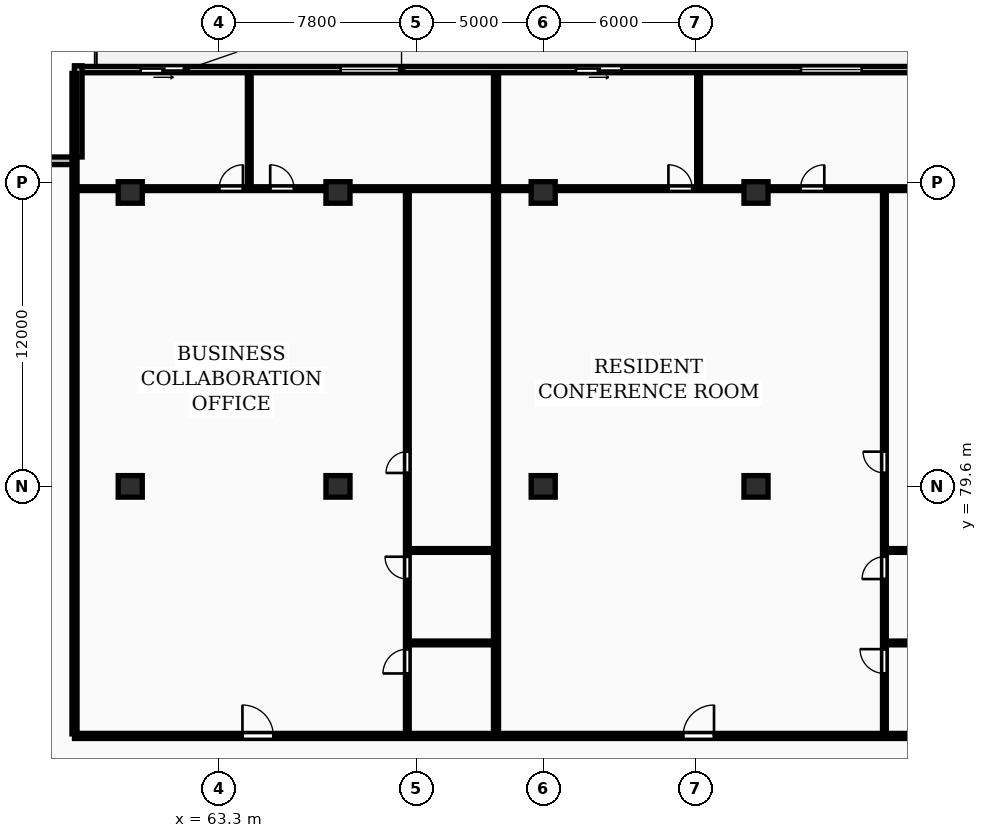
"""IFC4 building model, lengths in metres.
Left out: names, types, materials, properties, quantities, classifications, styles, units other than length and angle.
Written with IfcOpenShell. Run it as: python <this file> out.ifc"""

import sys

from ifc_helpers import new_model, si_unit, direction, frame, frame_2d, origin, origin_2d, place, context, subcontext, project, spatial, rectangle, extrude, element, fill, save


model = new_model("IFC4")
c1 = context("Model", 3, precision=1e-05, world=origin(), true_north=direction((0.0, 1.0)))
c2 = subcontext(c1, "Body", "Model", "MODEL_VIEW")
j1 = project(units=[si_unit("LENGTHUNIT", "METRE"), si_unit("PLANEANGLEUNIT", "RADIAN")], contexts=[c1])
p1 = place(None, origin())
s1 = spatial("IfcSite", under=j1, at=p1, CompositionType="ELEMENT")
p2 = place(p1, origin())
s2 = spatial("IfcBuilding", under=s1, at=p2, CompositionType="ELEMENT")
p3 = place(p2, frame((0.0, 0.0, 126.3)))
s3 = spatial("IfcBuildingStorey", under=s2, at=p3, CompositionType="ELEMENT", Elevation=126.3)
for number, where, z_axis, x_axis in (
    (1, (59.8, 79.6, 0.0), (0.0, 0.0, 1.0), (1.0, 0.0, 0.0)),
    (2, (59.8, 91.2, 0.0), (0.0, 0.0, 1.0), (1.0, 0.0, 0.0)),
    (3, (68.0, 79.6, 0.0), (0.0, 0.0, 1.0), (1.0, 0.0, 0.0)),
    (4, (68.0, 91.2, 0.0), (0.0, 0.0, 1.0), (1.0, 0.0, 0.0)),
    (5, (76.1, 79.6, 0.0), (0.0, 0.0, 1.0), (1.0, 0.0, 0.0)),
    (6, (76.1, 91.2, 0.0), (0.0, 0.0, 1.0), (1.0, 0.0, 0.0)),
    (7, (84.5, 79.6, 0.0), (0.0, 0.0, 1.0), (1.0, 0.0, 0.0)),
    (8, (84.5, 91.2, 0.0), (0.0, 0.0, 1.0), (1.0, 0.0, 0.0)),
):
    element("IfcColumn", number, at=place(p3, frame(where, z_axis=z_axis, x_axis=x_axis)), inside=s3, PredefinedType="COLUMN", context=c2, shape_type="SweptSolid", body=[
        extrude(rectangle(XDim=0.95, YDim=0.85, at=origin_2d()), origin(), (0.0, 0.0, 1.0), 3.25),
    ])
p4 = place(p3, frame((130.6, 96.05, 0.0), z_axis=(0.0, 0.0, 1.0), x_axis=(-1.0, 0.0, 0.0)))
e9 = element("IfcWall", 9, at=p4, inside=s3, PredefinedType="STANDARD", context=c2, shape_type="SweptSolid", body=[
    extrude(rectangle(XDim=73.0, YDim=0.25, at=frame_2d((36.5, 0.0))), origin(), (0.0, 0.0, 1.0), 2.97),
])
p5 = place(p4, frame((68.591, 0.0, 0.0)))
e10 = element("IfcOpeningElement", 10, at=p5, cuts=e9, PredefinedType="OPENING", context=c2, shape_type="SweptSolid", body=[
    extrude(rectangle(XDim=1.8, YDim=2.2, at=frame_2d((0.9, 1.1))), frame((0.0, 0.135, 0.0), z_axis=(0.0, -1.0, 0.0), x_axis=(1.0, 0.0, 0.0)), (0.0, 0.0, 1.0), 0.27),
])
p6 = place(p4, frame((60.092, 0.0, 0.85)))
e11 = element("IfcOpeningElement", 11, at=p6, cuts=e9, PredefinedType="OPENING", context=c2, shape_type="SweptSolid", body=[
    extrude(rectangle(XDim=2.4, YDim=1.9, at=frame_2d((1.2, 0.95))), frame((0.0, 0.135, 0.0), z_axis=(0.0, -1.0, 0.0), x_axis=(1.0, 0.0, 0.0)), (0.0, 0.0, 1.0), 0.27),
])
p7 = place(p4, frame((51.405, 0.0, 0.0)))
e12 = element("IfcOpeningElement", 12, at=p7, cuts=e9, PredefinedType="OPENING", context=c2, shape_type="SweptSolid", body=[
    extrude(rectangle(XDim=1.8, YDim=2.2, at=frame_2d((0.9, 1.1))), frame((0.0, 0.135, 0.0), z_axis=(0.0, -1.0, 0.0), x_axis=(1.0, 0.0, 0.0)), (0.0, 0.0, 1.0), 0.27),
])
p8 = place(p4, frame((41.925, 0.0, 0.85)))
e13 = element("IfcOpeningElement", 13, at=p8, cuts=e9, PredefinedType="OPENING", context=c2, shape_type="SweptSolid", body=[
    extrude(rectangle(XDim=2.4, YDim=1.9, at=frame_2d((1.2, 0.95))), frame((0.0, 0.135, 0.0), z_axis=(0.0, -1.0, 0.0), x_axis=(1.0, 0.0, 0.0)), (0.0, 0.0, 1.0), 0.27),
])
p9 = place(p4, frame((29.091, 0.0, 0.85)))
e14 = element("IfcOpeningElement", 14, at=p9, cuts=e9, PredefinedType="OPENING", context=c2, shape_type="SweptSolid", body=[
    extrude(rectangle(XDim=2.4, YDim=1.9, at=frame_2d((1.2, 0.95))), frame((0.0, 0.135, 0.0), z_axis=(0.0, -1.0, 0.0), x_axis=(1.0, 0.0, 0.0)), (0.0, 0.0, 1.0), 0.27),
])
p10 = place(p4, frame((23.727, 0.0, 0.85)))
e15 = element("IfcOpeningElement", 15, at=p10, cuts=e9, PredefinedType="OPENING", context=c2, shape_type="SweptSolid", body=[
    extrude(rectangle(XDim=2.4, YDim=1.9, at=frame_2d((1.2, 0.95))), frame((0.0, 0.135, 0.0), z_axis=(0.0, -1.0, 0.0), x_axis=(1.0, 0.0, 0.0)), (0.0, 0.0, 1.0), 0.27),
])
p11 = place(p4, frame((34.407, 0.0, 0.0)))
e16 = element("IfcOpeningElement", 16, at=p11, cuts=e9, PredefinedType="OPENING", context=c2, shape_type="SweptSolid", body=[
    extrude(rectangle(XDim=1.8, YDim=2.2, at=frame_2d((0.9, 1.1))), frame((0.0, 0.135, 0.0), z_axis=(0.0, -1.0, 0.0), x_axis=(1.0, 0.0, 0.0)), (0.0, 0.0, 1.0), 0.27),
])
p12 = place(p4, frame((18.72, 0.0, 0.85)))
e17 = element("IfcOpeningElement", 17, at=p12, cuts=e9, PredefinedType="OPENING", context=c2, shape_type="SweptSolid", body=[
    extrude(rectangle(XDim=2.4, YDim=1.9, at=frame_2d((1.2, 0.95))), frame((0.0, 0.135, 0.0), z_axis=(0.0, -1.0, 0.0), x_axis=(1.0, 0.0, 0.0)), (0.0, 0.0, 1.0), 0.27),
])
p13 = place(p4, frame((9.169, 0.0, 0.85)))
e18 = element("IfcOpeningElement", 18, at=p13, cuts=e9, PredefinedType="OPENING", context=c2, shape_type="SweptSolid", body=[
    extrude(rectangle(XDim=2.4, YDim=1.9, at=frame_2d((1.2, 0.95))), frame((0.0, 0.135, 0.0), z_axis=(0.0, -1.0, 0.0), x_axis=(1.0, 0.0, 0.0)), (0.0, 0.0, 1.0), 0.27),
])
p14 = place(p4, frame((5.506, 0.0, 0.85)))
e19 = element("IfcOpeningElement", 19, at=p14, cuts=e9, PredefinedType="OPENING", context=c2, shape_type="SweptSolid", body=[
    extrude(rectangle(XDim=1.8, YDim=1.8, at=frame_2d((0.9, 0.9))), frame((0.0, 0.135, 0.0), z_axis=(0.0, -1.0, 0.0), x_axis=(1.0, 0.0, 0.0)), (0.0, 0.0, 1.0), 0.27),
])
p15 = place(p4, frame((14.015, 0.0, 0.0)))
e20 = element("IfcOpeningElement", 20, at=p15, cuts=e9, PredefinedType="OPENING", context=c2, shape_type="SweptSolid", body=[
    extrude(rectangle(XDim=1.8, YDim=2.2, at=frame_2d((0.9, 1.1))), frame((0.0, 0.135, 0.0), z_axis=(0.0, -1.0, 0.0), x_axis=(1.0, 0.0, 0.0)), (0.0, 0.0, 1.0), 0.27),
])
p16 = place(p4, frame((1.135, 0.0, 0.85)))
e21 = element("IfcOpeningElement", 21, at=p16, cuts=e9, PredefinedType="OPENING", context=c2, shape_type="SweptSolid", body=[
    extrude(rectangle(XDim=2.4, YDim=1.9, at=frame_2d((1.2, 0.95))), frame((0.0, 0.135, 0.0), z_axis=(0.0, -1.0, 0.0), x_axis=(1.0, 0.0, 0.0)), (0.0, 0.0, 1.0), 0.27),
])
p17 = place(p3, frame((57.75, 96.2, 0.0), z_axis=(0.0, 0.0, 1.0), x_axis=(0.0, -1.0, 0.0)))
e22 = element("IfcWall", 22, at=p17, inside=s3, PredefinedType="STANDARD", context=c2, shape_type="SweptSolid", body=[
    extrude(rectangle(XDim=3.6, YDim=0.3, at=frame_2d((1.8, 0.0))), origin(), (0.0, 0.0, 1.0), 2.97),
])
p18 = place(p3, frame((57.6, 92.45, 0.0), z_axis=(0.0, 0.0, 1.0), x_axis=(-1.0, 0.0, 0.0)))
e23 = element("IfcWall", 23, at=p18, inside=s3, PredefinedType="STANDARD", context=c2, shape_type="SweptSolid", body=[
    extrude(rectangle(XDim=3.6, YDim=0.3, at=frame_2d((1.8, 0.0))), origin(), (0.0, 0.0, 1.0), 2.97),
])
for number, where, z_axis, x_axis in (
    (24, (57.6, 69.83, 0.0), (0.0, 0.0, 1.0), (0.0, 1.0, 0.0)),
    (25, (74.238, 69.83, 0.0), (0.0, 0.0, 1.0), (0.0, 1.0, 0.0)),
):
    element("IfcWall", number, at=place(p3, frame(where, z_axis=z_axis, x_axis=x_axis)), inside=s3, PredefinedType="PARTITIONING", context=c2, shape_type="SweptSolid", body=[
        extrude(rectangle(XDim=26.07, YDim=0.2, at=frame_2d((13.035, 0.0))), origin(), (0.0, 0.0, 1.0), 2.97),
    ])
for number, where, z_axis, x_axis in (
    (26, (70.798, 73.42, 0.0), (0.0, 0.0, 1.0), (1.0, 0.0, 0.0)),
    (27, (70.798, 77.07, 0.0), (0.0, 0.0, 1.0), (1.0, 0.0, 0.0)),
):
    element("IfcWall", number, at=place(p3, frame(where, z_axis=z_axis, x_axis=x_axis)), inside=s3, PredefinedType="PARTITIONING", context=c2, shape_type="SweptSolid", body=[
        extrude(rectangle(XDim=3.36, YDim=0.15, at=frame_2d((1.68, 0.0))), origin(), (0.0, 0.0, 1.0), 2.97),
    ])
p19 = place(p3, frame((70.738, 69.81, 0.0), z_axis=(0.0, 0.0, 1.0), x_axis=(0.0, 1.0, 0.0)))
e28 = element("IfcWall", 28, at=p19, inside=s3, PredefinedType="PARTITIONING", context=c2, shape_type="SweptSolid", body=[
    extrude(rectangle(XDim=21.48, YDim=0.15, at=frame_2d((10.74, 0.0))), origin(), (0.0, 0.0, 1.0), 2.97),
])
p20 = place(p19, frame((2.406, 0.0, 0.0)))
e29 = element("IfcOpeningElement", 29, at=p20, cuts=e28, PredefinedType="OPENING", context=c2, shape_type="SweptSolid", body=[
    extrude(rectangle(XDim=0.96, YDim=2.1, at=frame_2d((0.48, 1.05))), frame((0.0, 0.085, 0.0), z_axis=(0.0, -1.0, 0.0), x_axis=(1.0, 0.0, 0.0)), (0.0, 0.0, 1.0), 0.17),
])
p21 = place(p19, frame((6.133, 0.0, 0.0)))
e30 = element("IfcOpeningElement", 30, at=p21, cuts=e28, PredefinedType="OPENING", context=c2, shape_type="SweptSolid", body=[
    extrude(rectangle(XDim=0.88, YDim=2.06, at=frame_2d((0.44, 1.03))), frame((0.0, 0.085, 0.0), z_axis=(0.0, -1.0, 0.0), x_axis=(1.0, 0.0, 0.0)), (0.0, 0.0, 1.0), 0.17),
])
p22 = place(p19, frame((10.32, 0.0, 0.0)))
e31 = element("IfcOpeningElement", 31, at=p22, cuts=e28, PredefinedType="OPENING", context=c2, shape_type="SweptSolid", body=[
    extrude(rectangle(XDim=0.84, YDim=2.04, at=frame_2d((0.42, 1.02))), frame((0.0, 0.085, 0.0), z_axis=(0.0, -1.0, 0.0), x_axis=(1.0, 0.0, 0.0)), (0.0, 0.0, 1.0), 0.17),
])
p23 = place(p3, frame((64.499, 91.43, 0.0), z_axis=(0.0, 0.0, 1.0), x_axis=(0.0, 1.0, 0.0)))
e32 = element("IfcWall", 32, at=p23, inside=s3, PredefinedType="PARTITIONING", context=c2, shape_type="SweptSolid", body=[
    extrude(rectangle(XDim=4.47, YDim=0.15, at=frame_2d((2.235, 0.0))), origin(), (0.0, 0.0, 1.0), 2.97),
])
p24 = place(p3, frame((57.68, 91.35, 0.0), z_axis=(0.0, 0.0, 1.0), x_axis=(1.0, 0.0, 0.0)))
e33 = element("IfcWall", 33, at=p24, inside=s3, PredefinedType="PARTITIONING", context=c2, shape_type="SweptSolid", body=[
    extrude(rectangle(XDim=16.478, YDim=0.15, at=frame_2d((8.239, 0.0))), origin(), (0.0, 0.0, 1.0), 2.663),
])
p25 = place(p24, frame((5.629, 0.0, 0.0)))
e34 = element("IfcOpeningElement", 34, at=p25, cuts=e33, PredefinedType="OPENING", context=c2, shape_type="SweptSolid", body=[
    extrude(rectangle(XDim=0.94, YDim=2.1, at=frame_2d((0.47, 1.05))), frame((0.0, 0.085, 0.0), z_axis=(0.0, -1.0, 0.0), x_axis=(1.0, 0.0, 0.0)), (0.0, 0.0, 1.0), 0.17),
])
p26 = place(p24, frame((7.645, 0.0, 0.0)))
e35 = element("IfcOpeningElement", 35, at=p26, cuts=e33, PredefinedType="OPENING", context=c2, shape_type="SweptSolid", body=[
    extrude(rectangle(XDim=0.94, YDim=2.1, at=frame_2d((0.47, 1.05))), frame((0.0, 0.085, 0.0), z_axis=(0.0, -1.0, 0.0), x_axis=(1.0, 0.0, 0.0)), (0.0, 0.0, 1.0), 0.17),
])
for number, where, z_axis, x_axis in (
    (36, (89.627, 73.42, 0.0), (0.0, 0.0, 1.0), (1.0, 0.0, 0.0)),
    (37, (89.627, 77.07, 0.0), (0.0, 0.0, 1.0), (1.0, 0.0, 0.0)),
):
    element("IfcWall", number, at=place(p3, frame(where, z_axis=z_axis, x_axis=x_axis)), inside=s3, PredefinedType="PARTITIONING", context=c2, shape_type="SweptSolid", body=[
        extrude(rectangle(XDim=3.13, YDim=0.15, at=frame_2d((1.565, 0.0))), origin(), (0.0, 0.0, 1.0), 2.97),
    ])
p27 = place(p3, frame((89.567, 69.81, 0.0), z_axis=(0.0, 0.0, 1.0), x_axis=(0.0, 1.0, 0.0)))
e38 = element("IfcWall", 38, at=p27, inside=s3, PredefinedType="PARTITIONING", context=c2, shape_type="SweptSolid", body=[
    extrude(rectangle(XDim=21.48, YDim=0.15, at=frame_2d((10.74, 0.0))), origin(), (0.0, 0.0, 1.0), 2.97),
])
p28 = place(p27, frame((2.406, 0.0, 0.0)))
e39 = element("IfcOpeningElement", 39, at=p28, cuts=e38, PredefinedType="OPENING", context=c2, shape_type="SweptSolid", body=[
    extrude(rectangle(XDim=0.96, YDim=2.1, at=frame_2d((0.48, 1.05))), frame((0.0, 0.085, 0.0), z_axis=(0.0, -1.0, 0.0), x_axis=(1.0, 0.0, 0.0)), (0.0, 0.0, 1.0), 0.17),
])
p29 = place(p27, frame((6.133, 0.0, 0.0)))
e40 = element("IfcOpeningElement", 40, at=p29, cuts=e38, PredefinedType="OPENING", context=c2, shape_type="SweptSolid", body=[
    extrude(rectangle(XDim=0.88, YDim=2.06, at=frame_2d((0.44, 1.03))), frame((0.0, 0.085, 0.0), z_axis=(0.0, -1.0, 0.0), x_axis=(1.0, 0.0, 0.0)), (0.0, 0.0, 1.0), 0.17),
])
p30 = place(p27, frame((10.32, 0.0, 0.0)))
e41 = element("IfcOpeningElement", 41, at=p30, cuts=e38, PredefinedType="OPENING", context=c2, shape_type="SweptSolid", body=[
    extrude(rectangle(XDim=0.84, YDim=2.04, at=frame_2d((0.42, 1.02))), frame((0.0, 0.085, 0.0), z_axis=(0.0, -1.0, 0.0), x_axis=(1.0, 0.0, 0.0)), (0.0, 0.0, 1.0), 0.17),
])
p31 = place(p3, frame((82.232, 91.43, 0.0), z_axis=(0.0, 0.0, 1.0), x_axis=(0.0, 1.0, 0.0)))
e42 = element("IfcWall", 42, at=p31, inside=s3, PredefinedType="PARTITIONING", context=c2, shape_type="SweptSolid", body=[
    extrude(rectangle(XDim=4.47, YDim=0.15, at=frame_2d((2.235, 0.0))), origin(), (0.0, 0.0, 1.0), 2.97),
])
p32 = place(p3, frame((74.317, 91.35, 0.0), z_axis=(0.0, 0.0, 1.0), x_axis=(1.0, 0.0, 0.0)))
e43 = element("IfcWall", 43, at=p32, inside=s3, PredefinedType="PARTITIONING", context=c2, shape_type="SweptSolid", body=[
    extrude(rectangle(XDim=18.44, YDim=0.15, at=frame_2d((9.22, 0.0))), origin(), (0.0, 0.0, 1.0), 2.663),
])
p33 = place(p32, frame((6.725, 0.0, 0.0)))
e44 = element("IfcOpeningElement", 44, at=p33, cuts=e43, PredefinedType="OPENING", context=c2, shape_type="SweptSolid", body=[
    extrude(rectangle(XDim=0.94, YDim=2.1, at=frame_2d((0.47, 1.05))), frame((0.0, 0.085, 0.0), z_axis=(0.0, -1.0, 0.0), x_axis=(1.0, 0.0, 0.0)), (0.0, 0.0, 1.0), 0.17),
])
p34 = place(p32, frame((11.938, 0.0, 0.0)))
e45 = element("IfcOpeningElement", 45, at=p34, cuts=e43, PredefinedType="OPENING", context=c2, shape_type="SweptSolid", body=[
    extrude(rectangle(XDim=0.94, YDim=2.1, at=frame_2d((0.47, 1.05))), frame((0.0, 0.085, 0.0), z_axis=(0.0, -1.0, 0.0), x_axis=(1.0, 0.0, 0.0)), (0.0, 0.0, 1.0), 0.17),
])
p35 = place(p3, frame((57.6, 69.75, 0.0), z_axis=(0.0, 0.0, 1.0), x_axis=(1.0, 0.0, 0.0)))
e46 = element("IfcWall", 46, at=p35, inside=s3, PredefinedType="PARTITIONING", context=c2, shape_type="SweptSolid", body=[
    extrude(rectangle(XDim=73.0, YDim=0.2, at=frame_2d((36.5, 0.0))), origin(), (0.0, 0.0, 1.0), 2.97),
])
p36 = place(p35, frame((6.629, 0.0, 0.0)))
e47 = element("IfcOpeningElement", 47, at=p36, cuts=e46, PredefinedType="OPENING", context=c2, shape_type="SweptSolid", body=[
    extrude(rectangle(XDim=1.22, YDim=2.18, at=frame_2d((0.61, 1.09))), frame((0.0, 0.11, 0.0), z_axis=(0.0, -1.0, 0.0), x_axis=(1.0, 0.0, 0.0)), (0.0, 0.0, 1.0), 0.22),
])
p37 = place(p35, frame((24.022, 0.0, 0.0)))
e48 = element("IfcOpeningElement", 48, at=p37, cuts=e46, PredefinedType="OPENING", context=c2, shape_type="SweptSolid", body=[
    extrude(rectangle(XDim=1.22, YDim=2.18, at=frame_2d((0.61, 1.09))), frame((0.0, 0.11, 0.0), z_axis=(0.0, -1.0, 0.0), x_axis=(1.0, 0.0, 0.0)), (0.0, 0.0, 1.0), 0.22),
])
p38 = place(p35, frame((37.768, 0.0, 0.0)))
e49 = element("IfcOpeningElement", 49, at=p38, cuts=e46, PredefinedType="OPENING", context=c2, shape_type="SweptSolid", body=[
    extrude(rectangle(XDim=0.95, YDim=2.15, at=frame_2d((0.475, 1.075))), frame((0.0, 0.11, 0.0), z_axis=(0.0, -1.0, 0.0), x_axis=(1.0, 0.0, 0.0)), (0.0, 0.0, 1.0), 0.22),
])
p39 = place(p35, frame((57.57, 0.0, 0.0)))
e50 = element("IfcOpeningElement", 50, at=p39, cuts=e46, PredefinedType="OPENING", context=c2, shape_type="SweptSolid", body=[
    extrude(rectangle(XDim=0.95, YDim=2.15, at=frame_2d((0.475, 1.075))), frame((0.0, 0.11, 0.0), z_axis=(0.0, -1.0, 0.0), x_axis=(1.0, 0.0, 0.0)), (0.0, 0.0, 1.0), 0.22),
])
p40 = place(p5, origin())
e51 = element("IfcDoor", 51, at=p40, inside=s3, OperationType="SLIDING_TO_LEFT", PredefinedType="DOOR", context=c2, shape_type="SweptSolid", body=[
    extrude(rectangle(XDim=1.8, YDim=2.2, at=frame_2d((0.9, 1.1))), frame((0.0, 0.025, 0.0), z_axis=(0.0, -1.0, 0.0), x_axis=(1.0, 0.0, 0.0)), (0.0, 0.0, 1.0), 0.05),
])
fill(e10, e51)
p41 = place(p6, origin())
e52 = element("IfcWindow", 52, at=p41, inside=s3, PartitioningType="DOUBLE_PANEL_VERTICAL", PredefinedType="WINDOW", context=c2, shape_type="SweptSolid", body=[
    extrude(rectangle(XDim=2.4, YDim=1.9, at=frame_2d((1.2, 0.95))), frame((0.0, 0.03, 0.0), z_axis=(0.0, -1.0, 0.0), x_axis=(1.0, 0.0, 0.0)), (0.0, 0.0, 1.0), 0.06),
])
fill(e11, e52)
p42 = place(p7, origin())
e53 = element("IfcDoor", 53, at=p42, inside=s3, OperationType="SLIDING_TO_LEFT", PredefinedType="DOOR", context=c2, shape_type="SweptSolid", body=[
    extrude(rectangle(XDim=1.8, YDim=2.2, at=frame_2d((0.9, 1.1))), frame((0.0, 0.025, 0.0), z_axis=(0.0, -1.0, 0.0), x_axis=(1.0, 0.0, 0.0)), (0.0, 0.0, 1.0), 0.05),
])
fill(e12, e53)
p43 = place(p8, origin())
e54 = element("IfcWindow", 54, at=p43, inside=s3, PartitioningType="DOUBLE_PANEL_VERTICAL", PredefinedType="WINDOW", context=c2, shape_type="SweptSolid", body=[
    extrude(rectangle(XDim=2.4, YDim=1.9, at=frame_2d((1.2, 0.95))), frame((0.0, 0.03, 0.0), z_axis=(0.0, -1.0, 0.0), x_axis=(1.0, 0.0, 0.0)), (0.0, 0.0, 1.0), 0.06),
])
fill(e13, e54)
p44 = place(p20, origin())
e55 = element("IfcDoor", 55, at=p44, inside=s3, OperationType="SINGLE_SWING_LEFT", PredefinedType="DOOR", context=c2, shape_type="SweptSolid", body=[
    extrude(rectangle(XDim=0.96, YDim=2.1, at=frame_2d((0.48, 1.05))), frame((0.0, 0.025, 0.0), z_axis=(0.0, -1.0, 0.0), x_axis=(1.0, 0.0, 0.0)), (0.0, 0.0, 1.0), 0.05),
])
fill(e29, e55)
p45 = place(p21, origin())
e56 = element("IfcDoor", 56, at=p45, inside=s3, OperationType="SINGLE_SWING_RIGHT", PredefinedType="DOOR", context=c2, shape_type="SweptSolid", body=[
    extrude(rectangle(XDim=0.88, YDim=2.06, at=frame_2d((0.44, 1.03))), frame((0.0, 0.025, 0.0), z_axis=(0.0, -1.0, 0.0), x_axis=(1.0, 0.0, 0.0)), (0.0, 0.0, 1.0), 0.05),
])
fill(e30, e56)
p46 = place(p22, origin())
e57 = element("IfcDoor", 57, at=p46, inside=s3, OperationType="SINGLE_SWING_LEFT", PredefinedType="DOOR", context=c2, shape_type="SweptSolid", body=[
    extrude(rectangle(XDim=0.84, YDim=2.04, at=frame_2d((0.42, 1.02))), frame((0.0, 0.025, 0.0), z_axis=(0.0, -1.0, 0.0), x_axis=(1.0, 0.0, 0.0)), (0.0, 0.0, 1.0), 0.05),
])
fill(e31, e57)
p47 = place(p25, origin())
e58 = element("IfcDoor", 58, at=p47, inside=s3, OperationType="SINGLE_SWING_RIGHT", PredefinedType="DOOR", context=c2, shape_type="SweptSolid", body=[
    extrude(rectangle(XDim=0.94, YDim=2.1, at=frame_2d((0.47, 1.05))), frame((0.0, 0.025, 0.0), z_axis=(0.0, -1.0, 0.0), x_axis=(1.0, 0.0, 0.0)), (0.0, 0.0, 1.0), 0.05),
])
fill(e34, e58)
p48 = place(p26, origin())
e59 = element("IfcDoor", 59, at=p48, inside=s3, OperationType="SINGLE_SWING_LEFT", PredefinedType="DOOR", context=c2, shape_type="SweptSolid", body=[
    extrude(rectangle(XDim=0.94, YDim=2.1, at=frame_2d((0.47, 1.05))), frame((0.0, 0.025, 0.0), z_axis=(0.0, -1.0, 0.0), x_axis=(1.0, 0.0, 0.0)), (0.0, 0.0, 1.0), 0.05),
])
fill(e35, e59)
p49 = place(p28, origin())
e60 = element("IfcDoor", 60, at=p49, inside=s3, OperationType="SINGLE_SWING_RIGHT", PredefinedType="DOOR", context=c2, shape_type="SweptSolid", body=[
    extrude(rectangle(XDim=0.96, YDim=2.1, at=frame_2d((0.48, 1.05))), frame((0.0, 0.025, 0.0), z_axis=(0.0, -1.0, 0.0), x_axis=(1.0, 0.0, 0.0)), (0.0, 0.0, 1.0), 0.05),
])
fill(e39, e60)
p50 = place(p29, origin())
e61 = element("IfcDoor", 61, at=p50, inside=s3, OperationType="SINGLE_SWING_LEFT", PredefinedType="DOOR", context=c2, shape_type="SweptSolid", body=[
    extrude(rectangle(XDim=0.88, YDim=2.06, at=frame_2d((0.44, 1.03))), frame((0.0, 0.025, 0.0), z_axis=(0.0, -1.0, 0.0), x_axis=(1.0, 0.0, 0.0)), (0.0, 0.0, 1.0), 0.05),
])
fill(e40, e61)
p51 = place(p30, origin())
e62 = element("IfcDoor", 62, at=p51, inside=s3, OperationType="SINGLE_SWING_RIGHT", PredefinedType="DOOR", context=c2, shape_type="SweptSolid", body=[
    extrude(rectangle(XDim=0.84, YDim=2.04, at=frame_2d((0.42, 1.02))), frame((0.0, 0.025, 0.0), z_axis=(0.0, -1.0, 0.0), x_axis=(1.0, 0.0, 0.0)), (0.0, 0.0, 1.0), 0.05),
])
fill(e41, e62)
p52 = place(p33, origin())
e63 = element("IfcDoor", 63, at=p52, inside=s3, OperationType="SINGLE_SWING_LEFT", PredefinedType="DOOR", context=c2, shape_type="SweptSolid", body=[
    extrude(rectangle(XDim=0.94, YDim=2.1, at=frame_2d((0.47, 1.05))), frame((0.0, 0.025, 0.0), z_axis=(0.0, -1.0, 0.0), x_axis=(1.0, 0.0, 0.0)), (0.0, 0.0, 1.0), 0.05),
])
fill(e44, e63)
p53 = place(p34, origin())
e64 = element("IfcDoor", 64, at=p53, inside=s3, OperationType="SINGLE_SWING_RIGHT", PredefinedType="DOOR", context=c2, shape_type="SweptSolid", body=[
    extrude(rectangle(XDim=0.94, YDim=2.1, at=frame_2d((0.47, 1.05))), frame((0.0, 0.025, 0.0), z_axis=(0.0, -1.0, 0.0), x_axis=(1.0, 0.0, 0.0)), (0.0, 0.0, 1.0), 0.05),
])
fill(e45, e64)
p54 = place(p36, origin())
e65 = element("IfcDoor", 65, at=p54, inside=s3, OperationType="SINGLE_SWING_LEFT", PredefinedType="DOOR", context=c2, shape_type="SweptSolid", body=[
    extrude(rectangle(XDim=1.22, YDim=2.18, at=frame_2d((0.61, 1.09))), frame((0.0, 0.025, 0.0), z_axis=(0.0, -1.0, 0.0), x_axis=(1.0, 0.0, 0.0)), (0.0, 0.0, 1.0), 0.05),
])
fill(e47, e65)
p55 = place(p37, origin())
e66 = element("IfcDoor", 66, at=p55, inside=s3, OperationType="SINGLE_SWING_RIGHT", PredefinedType="DOOR", context=c2, shape_type="SweptSolid", body=[
    extrude(rectangle(XDim=1.22, YDim=2.18, at=frame_2d((0.61, 1.09))), frame((0.0, 0.025, 0.0), z_axis=(0.0, -1.0, 0.0), x_axis=(1.0, 0.0, 0.0)), (0.0, 0.0, 1.0), 0.05),
])
fill(e48, e66)
save(model, sys.argv[1])
